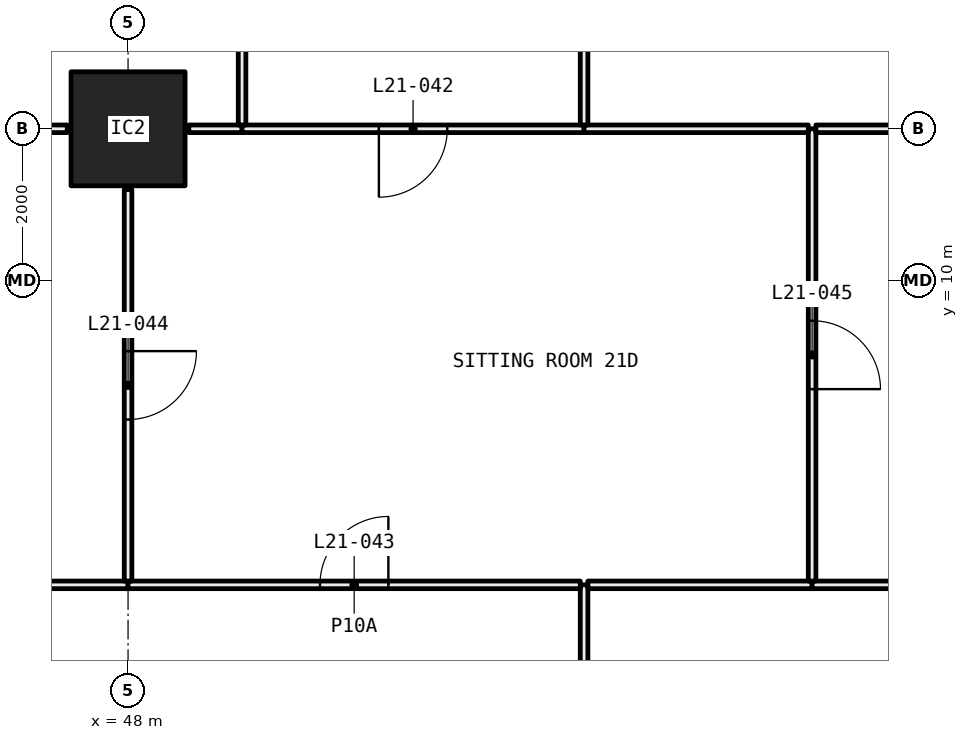
"""IFC4 building model, lengths in metres.
Left out: names, types, materials, properties, quantities, classifications, styles, units other than length and angle.
Written with IfcOpenShell. Run it as: python <this file> out.ifc"""

import sys

from ifc_helpers import new_model, si_unit, direction, frame, frame_2d, origin, origin_2d, place, context, subcontext, project, spatial, rectangle, hollow_rectangle, extrude, element, fill, save


model = new_model("IFC4")
c1 = context("Model", 3, precision=1e-05, world=origin(), true_north=direction((0.0, 1.0)))
c2 = subcontext(c1, "Body", "Model", "MODEL_VIEW")
j1 = project(units=[si_unit("LENGTHUNIT", "METRE"), si_unit("PLANEANGLEUNIT", "RADIAN")], contexts=[c1])
p1 = place(None, origin())
s1 = spatial("IfcSite", under=j1, at=p1, CompositionType="ELEMENT")
p2 = place(p1, origin())
s2 = spatial("IfcBuilding", under=s1, at=p2, CompositionType="ELEMENT")
p3 = place(p2, frame((0.0, 0.0, 85.2)))
s3 = spatial("IfcBuildingStorey", under=s2, at=p3, CompositionType="ELEMENT", Elevation=85.2)
p4 = place(p3, frame((48.0, 12.0, 0.0), z_axis=(0.0, 0.0, 1.0), x_axis=(1.0, 0.0, 0.0)))
e1 = element("IfcColumn", 1, at=p4, inside=s3, PredefinedType="COLUMN", context=c2, shape_type="SweptSolid", body=[
    extrude(hollow_rectangle(XDim=1.5, YDim=1.5, WallThickness=0.065, at=origin_2d()), origin(), (0.0, 0.0, 1.0), 3.05),
])
p5 = place(p3, frame((54.0, 0.72, 0.0), z_axis=(0.0, 0.0, 1.0), x_axis=(0.0, 1.0, 0.0)))
e2 = element("IfcWall", 2, at=p5, inside=s3, PredefinedType="PARTITIONING", context=c2, shape_type="SweptSolid", body=[
    extrude(rectangle(XDim=5.28, YDim=0.1, at=frame_2d((2.64, 0.0))), origin(), (0.0, 0.0, 1.0), 3.05),
])
p6 = place(p5, frame((2.19, 0.0, 0.0)))
e3 = element("IfcOpeningElement", 3, at=p6, cuts=e2, PredefinedType="OPENING", context=c2, shape_type="SweptSolid", body=[
    extrude(rectangle(XDim=0.9, YDim=2.1, at=frame_2d((0.45, 1.05))), frame((0.0, 0.06, 0.0), z_axis=(0.0, -1.0, 0.0), x_axis=(1.0, 0.0, 0.0)), (0.0, 0.0, 1.0), 0.12),
])
p7 = place(p3, frame((48.0, 6.0, 0.0), z_axis=(0.0, 0.0, 1.0), x_axis=(-1.0, 0.0, 0.0)))
e4 = element("IfcWall", 4, at=p7, inside=s3, PredefinedType="PARTITIONING", context=c2, shape_type="SweptSolid", body=[
    extrude(rectangle(XDim=5.95, YDim=0.1, at=frame_2d((2.975, 0.0))), origin(), (0.0, 0.0, 1.0), 2.45),
])
p8 = place(p3, frame((53.95, 6.0, 0.0), z_axis=(0.0, 0.0, 1.0), x_axis=(-1.0, 0.0, 0.0)))
e5 = element("IfcWall", 5, at=p8, inside=s3, PredefinedType="PARTITIONING", context=c2, shape_type="SweptSolid", body=[
    extrude(rectangle(XDim=5.95, YDim=0.1, at=frame_2d((2.975, 0.0))), origin(), (0.0, 0.0, 1.0), 2.45),
])
p9 = place(p8, frame((2.525, 0.0, 0.0)))
e6 = element("IfcOpeningElement", 6, at=p9, cuts=e5, PredefinedType="OPENING", context=c2, shape_type="SweptSolid", body=[
    extrude(rectangle(XDim=0.9, YDim=2.1, at=frame_2d((0.45, 1.05))), frame((0.0, 0.06, 0.0), z_axis=(0.0, -1.0, 0.0), x_axis=(1.0, 0.0, 0.0)), (0.0, 0.0, 1.0), 0.12),
])
p10 = place(p3, frame((57.0, 6.0, 0.0), z_axis=(0.0, 0.0, 1.0), x_axis=(-1.0, 0.0, 0.0)))
e7 = element("IfcWall", 7, at=p10, inside=s3, PredefinedType="PARTITIONING", context=c2, shape_type="SweptSolid", body=[
    extrude(rectangle(XDim=2.95, YDim=0.1, at=frame_2d((1.475, 0.0))), origin(), (0.0, 0.0, 1.0), 3.05),
])
p11 = place(p3, frame((59.95, 6.0, 0.0), z_axis=(0.0, 0.0, 1.0), x_axis=(-1.0, 0.0, 0.0)))
e8 = element("IfcWall", 8, at=p11, inside=s3, PredefinedType="PARTITIONING", context=c2, shape_type="SweptSolid", body=[
    extrude(rectangle(XDim=2.95, YDim=0.1, at=frame_2d((1.475, 0.0))), origin(), (0.0, 0.0, 1.0), 2.45),
])
p12 = place(p3, frame((48.0, 6.05, 0.0), z_axis=(0.0, 0.0, 1.0), x_axis=(0.0, 1.0, 0.0)))
e9 = element("IfcWall", 9, at=p12, inside=s3, PredefinedType="PARTITIONING", context=c2, shape_type="SweptSolid", body=[
    extrude(rectangle(XDim=5.15, YDim=0.1, at=frame_2d((2.575, 0.0))), origin(), (0.0, 0.0, 1.0), 2.45),
])
p13 = place(p12, frame((2.125, 0.0, 0.0)))
e10 = element("IfcOpeningElement", 10, at=p13, cuts=e9, PredefinedType="OPENING", context=c2, shape_type="SweptSolid", body=[
    extrude(rectangle(XDim=0.9, YDim=2.1, at=frame_2d((0.45, 1.05))), frame((0.0, 0.06, 0.0), z_axis=(0.0, -1.0, 0.0), x_axis=(1.0, 0.0, 0.0)), (0.0, 0.0, 1.0), 0.12),
])
p14 = place(p3, frame((47.2, 12.0, 0.0), z_axis=(0.0, 0.0, 1.0), x_axis=(-1.0, 0.0, 0.0)))
e11 = element("IfcWall", 11, at=p14, inside=s3, PredefinedType="PARTITIONING", context=c2, shape_type="SweptSolid", body=[
    extrude(rectangle(XDim=5.2, YDim=0.1, at=frame_2d((2.6, 0.0))), origin(), (0.0, 0.0, 1.0), 2.45),
])
p15 = place(p3, frame((57.0, 6.05, 0.0), z_axis=(0.0, 0.0, 1.0), x_axis=(0.0, 1.0, 0.0)))
e12 = element("IfcWall", 12, at=p15, inside=s3, PredefinedType="PARTITIONING", context=c2, shape_type="SweptSolid", body=[
    extrude(rectangle(XDim=5.95, YDim=0.1, at=frame_2d((2.975, 0.0))), origin(), (0.0, 0.0, 1.0), 2.45),
])
p16 = place(p15, frame((2.525, 0.0, 0.0)))
e13 = element("IfcOpeningElement", 13, at=p16, cuts=e12, PredefinedType="OPENING", context=c2, shape_type="SweptSolid", body=[
    extrude(rectangle(XDim=0.9, YDim=2.1, at=frame_2d((0.45, 1.05))), frame((0.0, 0.06, 0.0), z_axis=(0.0, -1.0, 0.0), x_axis=(1.0, 0.0, 0.0)), (0.0, 0.0, 1.0), 0.12),
])
p17 = place(p3, frame((49.5, 12.0, 0.0), z_axis=(0.0, 0.0, 1.0), x_axis=(-1.0, 0.0, 0.0)))
e14 = element("IfcWall", 14, at=p17, inside=s3, PredefinedType="PARTITIONING", context=c2, shape_type="SweptSolid", body=[
    extrude(rectangle(XDim=0.7, YDim=0.1, at=frame_2d((0.35, 0.0))), origin(), (0.0, 0.0, 1.0), 2.45),
])
p18 = place(p3, frame((54.0, 12.0, 0.0), z_axis=(0.0, 0.0, 1.0), x_axis=(-1.0, 0.0, 0.0)))
e15 = element("IfcWall", 15, at=p18, inside=s3, PredefinedType="PARTITIONING", context=c2, shape_type="SweptSolid", body=[
    extrude(rectangle(XDim=4.5, YDim=0.1, at=frame_2d((2.25, 0.0))), origin(), (0.0, 0.0, 1.0), 2.45),
])
p19 = place(p18, frame((1.8, 0.0, 0.0)))
e16 = element("IfcOpeningElement", 16, at=p19, cuts=e15, PredefinedType="OPENING", context=c2, shape_type="SweptSolid", body=[
    extrude(rectangle(XDim=0.9, YDim=2.1, at=frame_2d((0.45, 1.05))), frame((0.0, 0.06, 0.0), z_axis=(0.0, -1.0, 0.0), x_axis=(1.0, 0.0, 0.0)), (0.0, 0.0, 1.0), 0.12),
])
p20 = place(p3, frame((56.95, 12.0, 0.0), z_axis=(0.0, 0.0, 1.0), x_axis=(-1.0, 0.0, 0.0)))
e17 = element("IfcWall", 17, at=p20, inside=s3, PredefinedType="PARTITIONING", context=c2, shape_type="SweptSolid", body=[
    extrude(rectangle(XDim=2.95, YDim=0.1, at=frame_2d((1.475, 0.0))), origin(), (0.0, 0.0, 1.0), 2.45),
])
p21 = place(p3, frame((59.2, 12.0, 0.0), z_axis=(0.0, 0.0, 1.0), x_axis=(-1.0, 0.0, 0.0)))
e18 = element("IfcWall", 18, at=p21, inside=s3, PredefinedType="PARTITIONING", context=c2, shape_type="SweptSolid", body=[
    extrude(rectangle(XDim=2.15, YDim=0.1, at=frame_2d((1.075, 0.0))), origin(), (0.0, 0.0, 1.0), 2.45),
])
p22 = place(p3, frame((49.5, 12.05, 0.0), z_axis=(0.0, 0.0, 1.0), x_axis=(0.0, 1.0, 0.0)))
e19 = element("IfcWall", 19, at=p22, inside=s3, PredefinedType="PARTITIONING", context=c2, shape_type="SweptSolid", body=[
    extrude(rectangle(XDim=5.85, YDim=0.1, at=frame_2d((2.925, 0.0))), origin(), (0.0, 0.0, 1.0), 2.45),
])
p23 = place(p22, frame((2.475, 0.0, 0.0)))
e20 = element("IfcOpeningElement", 20, at=p23, cuts=e19, PredefinedType="OPENING", context=c2, shape_type="SweptSolid", body=[
    extrude(rectangle(XDim=0.9, YDim=2.1, at=frame_2d((0.45, 1.05))), frame((0.0, 0.06, 0.0), z_axis=(0.0, -1.0, 0.0), x_axis=(1.0, 0.0, 0.0)), (0.0, 0.0, 1.0), 0.12),
])
p24 = place(p3, frame((54.0, 12.05, 0.0), z_axis=(0.0, 0.0, 1.0), x_axis=(0.0, 1.0, 0.0)))
e21 = element("IfcWall", 21, at=p24, inside=s3, PredefinedType="PARTITIONING", context=c2, shape_type="SweptSolid", body=[
    extrude(rectangle(XDim=5.85, YDim=0.1, at=frame_2d((2.925, 0.0))), origin(), (0.0, 0.0, 1.0), 2.45),
])
p25 = place(p24, frame((2.475, 0.0, 0.0)))
e22 = element("IfcOpeningElement", 22, at=p25, cuts=e21, PredefinedType="OPENING", context=c2, shape_type="SweptSolid", body=[
    extrude(rectangle(XDim=0.9, YDim=2.1, at=frame_2d((0.45, 1.05))), frame((0.0, 0.06, 0.0), z_axis=(0.0, -1.0, 0.0), x_axis=(1.0, 0.0, 0.0)), (0.0, 0.0, 1.0), 0.12),
])
p26 = place(p19, origin())
e23 = element("IfcDoor", 23, at=p26, inside=s3, OperationType="SINGLE_SWING_LEFT", PredefinedType="DOOR", context=c2, shape_type="SweptSolid", body=[
    extrude(rectangle(XDim=0.9, YDim=2.1, at=frame_2d((0.45, 1.05))), frame((0.0, 0.025, 0.0), z_axis=(0.0, -1.0, 0.0), x_axis=(1.0, 0.0, 0.0)), (0.0, 0.0, 1.0), 0.05),
])
fill(e16, e23)
p27 = place(p9, frame((0.9, 0.0, 0.0), x_axis=(-1.0, 0.0, 0.0)))
e24 = element("IfcDoor", 24, at=p27, inside=s3, OperationType="SINGLE_SWING_LEFT", PredefinedType="DOOR", context=c2, shape_type="SweptSolid", body=[
    extrude(rectangle(XDim=0.9, YDim=2.1, at=frame_2d((0.45, 1.05))), frame((0.0, 0.025, 0.0), z_axis=(0.0, -1.0, 0.0), x_axis=(1.0, 0.0, 0.0)), (0.0, 0.0, 1.0), 0.05),
])
fill(e6, e24)
p28 = place(p13, frame((0.9, 0.0, 0.0), x_axis=(-1.0, 0.0, 0.0)))
e25 = element("IfcDoor", 25, at=p28, inside=s3, OperationType="SINGLE_SWING_RIGHT", PredefinedType="DOOR", context=c2, shape_type="SweptSolid", body=[
    extrude(rectangle(XDim=0.9, YDim=2.1, at=frame_2d((0.45, 1.05))), frame((0.0, 0.025, 0.0), z_axis=(0.0, -1.0, 0.0), x_axis=(1.0, 0.0, 0.0)), (0.0, 0.0, 1.0), 0.05),
])
fill(e10, e25)
p29 = place(p16, frame((0.9, 0.0, 0.0), x_axis=(-1.0, 0.0, 0.0)))
e26 = element("IfcDoor", 26, at=p29, inside=s3, OperationType="SINGLE_SWING_LEFT", PredefinedType="DOOR", context=c2, shape_type="SweptSolid", body=[
    extrude(rectangle(XDim=0.9, YDim=2.1, at=frame_2d((0.45, 1.05))), frame((0.0, 0.025, 0.0), z_axis=(0.0, -1.0, 0.0), x_axis=(1.0, 0.0, 0.0)), (0.0, 0.0, 1.0), 0.05),
])
fill(e13, e26)
save(model, sys.argv[1])
